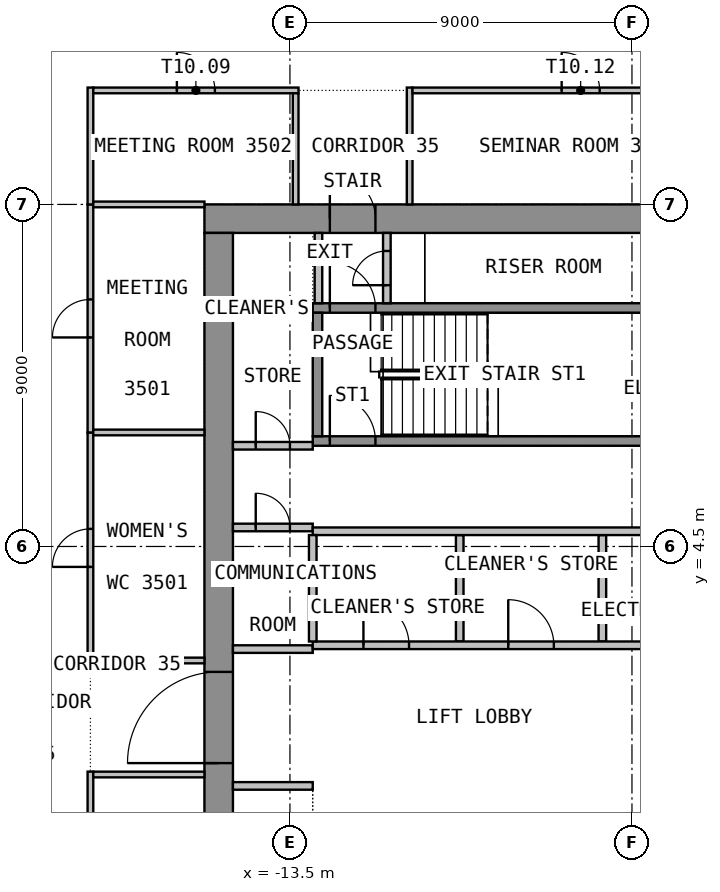
"""IFC4 building model, lengths in metres.
Left out: names, types, materials, properties, quantities, classifications, styles, units other than length and angle.
Written with IfcOpenShell. Run it as: python <this file> out.ifc"""

import sys

from ifc_helpers import new_model, si_unit, direction, frame, frame_2d, origin, place, context, subcontext, project, spatial, rectangle, extrude, element, fill, save


model = new_model("IFC4")
c1 = context("Model", 3, precision=1e-05, world=origin(), true_north=direction((0.0, 1.0)))
c2 = subcontext(c1, "Body", "Model", "MODEL_VIEW")
j1 = project(units=[si_unit("LENGTHUNIT", "METRE"), si_unit("PLANEANGLEUNIT", "RADIAN")], contexts=[c1])
p1 = place(None, origin())
s1 = spatial("IfcSite", under=j1, at=p1, CompositionType="ELEMENT")
p2 = place(p1, origin())
s2 = spatial("IfcBuilding", under=s1, at=p2, CompositionType="ELEMENT")
p3 = place(p2, frame((0.0, 0.0, 144.3)))
s3 = spatial("IfcBuildingStorey", under=s2, at=p3, CompositionType="ELEMENT", Elevation=144.3)
p4 = place(p3, frame((-15.75, 13.125, 0.0), z_axis=(0.0, 0.0, 1.0), x_axis=(1.0, 0.0, 0.0)))
e1 = element("IfcWall", 1, at=p4, inside=s3, PredefinedType="SHEAR", context=c2, shape_type="SweptSolid", body=[
    extrude(rectangle(XDim=31.5, YDim=0.75, at=frame_2d((15.75, 0.0))), origin(), (0.0, 0.0, 1.0), 3.575),
])
p5 = place(p4, frame((14.55, 0.0, 0.0)))
e2 = element("IfcOpeningElement", 2, at=p5, cuts=e1, PredefinedType="OPENING", context=c2, shape_type="SweptSolid", body=[
    extrude(rectangle(XDim=2.4, YDim=2.1, at=frame_2d((1.2, 1.05))), frame((0.0, 0.385, 0.0), z_axis=(0.0, -1.0, 0.0), x_axis=(1.0, 0.0, 0.0)), (0.0, 0.0, 1.0), 0.77),
])
p6 = place(p4, frame((3.3, 0.0, 0.0)))
e3 = element("IfcOpeningElement", 3, at=p6, cuts=e1, PredefinedType="OPENING", context=c2, shape_type="SweptSolid", body=[
    extrude(rectangle(XDim=1.2, YDim=2.1, at=frame_2d((0.6, 1.05))), frame((0.0, 0.385, 0.0), z_axis=(0.0, -1.0, 0.0), x_axis=(1.0, 0.0, 0.0)), (0.0, 0.0, 1.0), 0.77),
])
p7 = place(p4, frame((27.0, 0.0, 0.0)))
e4 = element("IfcOpeningElement", 4, at=p7, cuts=e1, PredefinedType="OPENING", context=c2, shape_type="SweptSolid", body=[
    extrude(rectangle(XDim=1.2, YDim=2.1, at=frame_2d((0.6, 1.05))), frame((0.0, 0.385, 0.0), z_axis=(0.0, -1.0, 0.0), x_axis=(1.0, 0.0, 0.0)), (0.0, 0.0, 1.0), 0.77),
])
p8 = place(p3, frame((-15.375, -12.75, 0.0), z_axis=(0.0, 0.0, 1.0), x_axis=(0.0, 1.0, 0.0)))
e5 = element("IfcWall", 5, at=p8, inside=s3, PredefinedType="SHEAR", context=c2, shape_type="SweptSolid", body=[
    extrude(rectangle(XDim=25.5, YDim=0.75, at=frame_2d((12.75, 0.0))), origin(), (0.0, 0.0, 1.0), 3.575),
])
p9 = place(p8, frame((11.55, 0.0, 0.0)))
e6 = element("IfcOpeningElement", 6, at=p9, cuts=e5, PredefinedType="OPENING", context=c2, shape_type="SweptSolid", body=[
    extrude(rectangle(XDim=2.4, YDim=2.1, at=frame_2d((1.2, 1.05))), frame((0.0, 0.385, 0.0), z_axis=(0.0, -1.0, 0.0), x_axis=(1.0, 0.0, 0.0)), (0.0, 0.0, 1.0), 0.77),
])
p10 = place(p3, frame((-12.9, 7.275, 0.0), z_axis=(0.0, 0.0, 1.0), x_axis=(1.0, 0.0, 0.0)))
e7 = element("IfcWall", 7, at=p10, inside=s3, PredefinedType="SHEAR", context=c2, shape_type="SweptSolid", body=[
    extrude(rectangle(XDim=10.1, YDim=0.25, at=frame_2d((5.05, 0.0))), origin(), (0.0, 0.0, 1.0), 3.575),
])
p11 = place(p10, frame((0.45, 0.0, 0.0)))
e8 = element("IfcOpeningElement", 8, at=p11, cuts=e7, PredefinedType="OPENING", context=c2, shape_type="SweptSolid", body=[
    extrude(rectangle(XDim=1.2, YDim=2.1, at=frame_2d((0.6, 1.05))), frame((0.0, 0.135, 0.0), z_axis=(0.0, -1.0, 0.0), x_axis=(1.0, 0.0, 0.0)), (0.0, 0.0, 1.0), 0.27),
])
p12 = place(p3, frame((-12.9, 10.775, 0.0), z_axis=(0.0, 0.0, 1.0), x_axis=(1.0, 0.0, 0.0)))
e9 = element("IfcWall", 9, at=p12, inside=s3, PredefinedType="SHEAR", context=c2, shape_type="SweptSolid", body=[
    extrude(rectangle(XDim=10.1, YDim=0.25, at=frame_2d((5.05, 0.0))), origin(), (0.0, 0.0, 1.0), 3.575),
])
p13 = place(p12, frame((0.45, 0.0, 0.0)))
e10 = element("IfcOpeningElement", 10, at=p13, cuts=e9, PredefinedType="OPENING", context=c2, shape_type="SweptSolid", body=[
    extrude(rectangle(XDim=1.2, YDim=2.1, at=frame_2d((0.6, 1.05))), frame((0.0, 0.135, 0.0), z_axis=(0.0, -1.0, 0.0), x_axis=(1.0, 0.0, 0.0)), (0.0, 0.0, 1.0), 0.27),
])
p14 = place(p3, frame((-12.775, 7.4, 0.0), z_axis=(0.0, 0.0, 1.0), x_axis=(0.0, 1.0, 0.0)))
e11 = element("IfcWall", 11, at=p14, inside=s3, PredefinedType="SHEAR", context=c2, shape_type="SweptSolid", body=[
    extrude(rectangle(XDim=3.25, YDim=0.25, at=frame_2d((1.625, 0.0))), origin(), (0.0, 0.0, 1.0), 3.575),
])
p15 = place(p3, frame((-12.75, 10.9, 0.0), z_axis=(0.0, 0.0, 1.0), x_axis=(0.0, 1.0, 0.0)))
e12 = element("IfcWall", 12, at=p15, inside=s3, PredefinedType="PARTITIONING", context=c2, shape_type="SweptSolid", body=[
    extrude(rectangle(XDim=1.85, YDim=0.2, at=frame_2d((0.925, 0.0))), origin(), (0.0, 0.0, 1.0), 3.575),
])
p16 = place(p3, frame((-10.95, 10.9, 0.0), z_axis=(0.0, 0.0, 1.0), x_axis=(0.0, 1.0, 0.0)))
e13 = element("IfcWall", 13, at=p16, inside=s3, PredefinedType="PARTITIONING", context=c2, shape_type="SweptSolid", body=[
    extrude(rectangle(XDim=1.85, YDim=0.2, at=frame_2d((0.925, 0.0))), origin(), (0.0, 0.0, 1.0), 3.575),
])
p17 = place(p16, frame((0.475, 0.0, 0.0)))
e14 = element("IfcOpeningElement", 14, at=p17, cuts=e13, PredefinedType="OPENING", context=c2, shape_type="SweptSolid", body=[
    extrude(rectangle(XDim=0.9, YDim=2.1, at=frame_2d((0.45, 1.05))), frame((0.0, 0.11, 0.0), z_axis=(0.0, -1.0, 0.0), x_axis=(1.0, 0.0, 0.0)), (0.0, 0.0, 1.0), 0.22),
])
p18 = place(p3, frame((-15.0, 7.15, 0.0), z_axis=(0.0, 0.0, 1.0), x_axis=(1.0, 0.0, 0.0)))
e15 = element("IfcWall", 15, at=p18, inside=s3, PredefinedType="PARTITIONING", context=c2, shape_type="SweptSolid", body=[
    extrude(rectangle(XDim=2.1, YDim=0.2, at=frame_2d((1.05, 0.0))), origin(), (0.0, 0.0, 1.0), 3.575),
])
p19 = place(p18, frame((0.6, 0.0, 0.0)))
e16 = element("IfcOpeningElement", 16, at=p19, cuts=e15, PredefinedType="OPENING", context=c2, shape_type="SweptSolid", body=[
    extrude(rectangle(XDim=0.9, YDim=2.1, at=frame_2d((0.45, 1.05))), frame((0.0, 0.11, 0.0), z_axis=(0.0, -1.0, 0.0), x_axis=(1.0, 0.0, 0.0)), (0.0, 0.0, 1.0), 0.22),
])
p20 = place(p3, frame((-15.0, 5.0, 0.0), z_axis=(0.0, 0.0, 1.0), x_axis=(1.0, 0.0, 0.0)))
e17 = element("IfcWall", 17, at=p20, inside=s3, PredefinedType="PARTITIONING", context=c2, shape_type="SweptSolid", body=[
    extrude(rectangle(XDim=2.1, YDim=0.2, at=frame_2d((1.05, 0.0))), origin(), (0.0, 0.0, 1.0), 3.575),
])
p21 = place(p20, frame((0.6, 0.0, 0.0)))
e18 = element("IfcOpeningElement", 18, at=p21, cuts=e17, PredefinedType="OPENING", context=c2, shape_type="SweptSolid", body=[
    extrude(rectangle(XDim=0.9, YDim=2.1, at=frame_2d((0.45, 1.05))), frame((0.0, 0.11, 0.0), z_axis=(0.0, -1.0, 0.0), x_axis=(1.0, 0.0, 0.0)), (0.0, 0.0, 1.0), 0.22),
])
for number, where, z_axis, x_axis in (
    (19, (-15.0, 1.8, 0.0), (0.0, 0.0, 1.0), (1.0, 0.0, 0.0)),
    (20, (-15.0, -1.8, 0.0), (0.0, 0.0, 1.0), (1.0, 0.0, 0.0)),
):
    element("IfcWall", number, at=place(p3, frame(where, z_axis=z_axis, x_axis=x_axis)), inside=s3, PredefinedType="PARTITIONING", context=c2, shape_type="SweptSolid", body=[
        extrude(rectangle(XDim=2.1, YDim=0.2, at=frame_2d((1.05, 0.0))), origin(), (0.0, 0.0, 1.0), 3.575),
    ])
for number, where, z_axis, x_axis in (
    (21, (-9.032, 2.0, 0.0), (0.0, 0.0, 1.0), (0.0, 1.0, 0.0)),
    (22, (-5.279, 2.0, 0.0), (0.0, 0.0, 1.0), (0.0, 1.0, 0.0)),
):
    element("IfcWall", number, at=place(p3, frame(where, z_axis=z_axis, x_axis=x_axis)), inside=s3, PredefinedType="PARTITIONING", context=c2, shape_type="SweptSolid", body=[
        extrude(rectangle(XDim=2.8, YDim=0.2, at=frame_2d((1.4, 0.0))), origin(), (0.0, 0.0, 1.0), 3.575),
    ])
p22 = place(p3, frame((-12.9, 1.9, 0.0), z_axis=(0.0, 0.0, 1.0), x_axis=(1.0, 0.0, 0.0)))
e23 = element("IfcWall", 23, at=p22, inside=s3, PredefinedType="PARTITIONING", context=c2, shape_type="SweptSolid", body=[
    extrude(rectangle(XDim=11.375, YDim=0.2, at=frame_2d((5.688, 0.0))), origin(), (0.0, 0.0, 1.0), 3.575),
])
p23 = place(p22, frame((1.334, 0.0, 0.0)))
e24 = element("IfcOpeningElement", 24, at=p23, cuts=e23, PredefinedType="OPENING", context=c2, shape_type="SweptSolid", body=[
    extrude(rectangle(XDim=1.2, YDim=2.1, at=frame_2d((0.6, 1.05))), frame((0.0, 0.11, 0.0), z_axis=(0.0, -1.0, 0.0), x_axis=(1.0, 0.0, 0.0)), (0.0, 0.0, 1.0), 0.22),
])
p24 = place(p22, frame((5.144, 0.0, 0.0)))
e25 = element("IfcOpeningElement", 25, at=p24, cuts=e23, PredefinedType="OPENING", context=c2, shape_type="SweptSolid", body=[
    extrude(rectangle(XDim=1.2, YDim=2.1, at=frame_2d((0.6, 1.05))), frame((0.0, 0.11, 0.0), z_axis=(0.0, -1.0, 0.0), x_axis=(1.0, 0.0, 0.0)), (0.0, 0.0, 1.0), 0.22),
])
p25 = place(p22, frame((8.898, 0.0, 0.0)))
e26 = element("IfcOpeningElement", 26, at=p25, cuts=e23, PredefinedType="OPENING", context=c2, shape_type="SweptSolid", body=[
    extrude(rectangle(XDim=1.2, YDim=2.1, at=frame_2d((0.6, 1.05))), frame((0.0, 0.11, 0.0), z_axis=(0.0, -1.0, 0.0), x_axis=(1.0, 0.0, 0.0)), (0.0, 0.0, 1.0), 0.22),
])
p26 = place(p3, frame((-12.9, 4.9, 0.0), z_axis=(0.0, 0.0, 1.0), x_axis=(1.0, 0.0, 0.0)))
e27 = element("IfcWall", 27, at=p26, inside=s3, PredefinedType="PARTITIONING", context=c2, shape_type="SweptSolid", body=[
    extrude(rectangle(XDim=11.375, YDim=0.2, at=frame_2d((5.688, 0.0))), origin(), (0.0, 0.0, 1.0), 3.575),
])
p27 = place(p3, frame((-12.9, 2.0, 0.0), z_axis=(0.0, 0.0, 1.0), x_axis=(0.0, 1.0, 0.0)))
e28 = element("IfcWall", 28, at=p27, inside=s3, PredefinedType="PARTITIONING", context=c2, shape_type="SweptSolid", body=[
    extrude(rectangle(XDim=2.8, YDim=0.2, at=frame_2d((1.4, 0.0))), origin(), (0.0, 0.0, 1.0), 3.575),
])
p28 = place(p3, frame((-18.75, -13.5, 0.0), z_axis=(0.0, 0.0, 1.0), x_axis=(0.0, 1.0, 0.0)))
e29 = element("IfcWall", 29, at=p28, inside=s3, PredefinedType="PARTITIONING", context=c2, shape_type="SweptSolid", body=[
    extrude(rectangle(XDim=12.075, YDim=0.15, at=frame_2d((6.038, 0.0))), origin(), (0.0, 0.0, 1.0), 3.575),
])
p29 = place(p28, frame((5.538, 0.0, 0.0)))
e30 = element("IfcOpeningElement", 30, at=p29, cuts=e29, PredefinedType="OPENING", context=c2, shape_type="SweptSolid", body=[
    extrude(rectangle(XDim=1.0, YDim=2.1, at=frame_2d((0.5, 1.05))), frame((0.0, 0.085, 0.0), z_axis=(0.0, -1.0, 0.0), x_axis=(1.0, 0.0, 0.0)), (0.0, 0.0, 1.0), 0.17),
])
p30 = place(p3, frame((-18.675, -1.5, 0.0), z_axis=(0.0, 0.0, 1.0), x_axis=(1.0, 0.0, 0.0)))
e31 = element("IfcWall", 31, at=p30, inside=s3, PredefinedType="PARTITIONING", context=c2, shape_type="SweptSolid", body=[
    extrude(rectangle(XDim=2.925, YDim=0.15, at=frame_2d((1.462, 0.0))), origin(), (0.0, 0.0, 1.0), 3.575),
])
p31 = place(p3, frame((-18.75, 1.425, 0.0), z_axis=(0.0, 0.0, 1.0), x_axis=(0.0, 1.0, 0.0)))
e32 = element("IfcWall", 32, at=p31, inside=s3, PredefinedType="PARTITIONING", context=c2, shape_type="SweptSolid", body=[
    extrude(rectangle(XDim=6.075, YDim=0.15, at=frame_2d((3.038, 0.0))), origin(), (0.0, 0.0, 1.0), 3.575),
])
p32 = place(p31, frame((2.538, 0.0, 0.0)))
e33 = element("IfcOpeningElement", 33, at=p32, cuts=e32, PredefinedType="OPENING", context=c2, shape_type="SweptSolid", body=[
    extrude(rectangle(XDim=1.0, YDim=2.1, at=frame_2d((0.5, 1.05))), frame((0.0, 0.085, 0.0), z_axis=(0.0, -1.0, 0.0), x_axis=(1.0, 0.0, 0.0)), (0.0, 0.0, 1.0), 0.17),
])
p33 = place(p3, frame((-15.75, 1.5, 0.0), z_axis=(0.0, 0.0, 1.0), x_axis=(-1.0, 0.0, 0.0)))
e34 = element("IfcWall", 34, at=p33, inside=s3, PredefinedType="PARTITIONING", context=c2, shape_type="SweptSolid", body=[
    extrude(rectangle(XDim=2.925, YDim=0.15, at=frame_2d((1.462, 0.0))), origin(), (0.0, 0.0, 1.0), 3.575),
])
p34 = place(p3, frame((-18.75, 7.5, 0.0), z_axis=(0.0, 0.0, 1.0), x_axis=(0.0, 1.0, 0.0)))
e35 = element("IfcWall", 35, at=p34, inside=s3, PredefinedType="PARTITIONING", context=c2, shape_type="SweptSolid", body=[
    extrude(rectangle(XDim=6.0, YDim=0.15, at=frame_2d((3.0, 0.0))), origin(), (0.0, 0.0, 1.0), 3.575),
])
p35 = place(p34, frame((2.5, 0.0, 0.0)))
e36 = element("IfcOpeningElement", 36, at=p35, cuts=e35, PredefinedType="OPENING", context=c2, shape_type="SweptSolid", body=[
    extrude(rectangle(XDim=1.0, YDim=2.1, at=frame_2d((0.5, 1.05))), frame((0.0, 0.085, 0.0), z_axis=(0.0, -1.0, 0.0), x_axis=(1.0, 0.0, 0.0)), (0.0, 0.0, 1.0), 0.17),
])
p36 = place(p3, frame((-18.675, 7.5, 0.0), z_axis=(0.0, 0.0, 1.0), x_axis=(1.0, 0.0, 0.0)))
e37 = element("IfcWall", 37, at=p36, inside=s3, PredefinedType="PARTITIONING", context=c2, shape_type="SweptSolid", body=[
    extrude(rectangle(XDim=2.925, YDim=0.15, at=frame_2d((1.462, 0.0))), origin(), (0.0, 0.0, 1.0), 3.575),
])
p37 = place(p3, frame((-18.75, 13.5, 0.0), z_axis=(0.0, 0.0, 1.0), x_axis=(0.0, 1.0, 0.0)))
e38 = element("IfcWall", 38, at=p37, inside=s3, PredefinedType="PARTITIONING", context=c2, shape_type="SweptSolid", body=[
    extrude(rectangle(XDim=3.075, YDim=0.15, at=frame_2d((1.538, 0.0))), origin(), (0.0, 0.0, 1.0), 3.575),
])
p38 = place(p3, frame((-18.675, 13.5, 0.0), z_axis=(0.0, 0.0, 1.0), x_axis=(1.0, 0.0, 0.0)))
e39 = element("IfcWall", 39, at=p38, inside=s3, PredefinedType="PARTITIONING", context=c2, shape_type="SweptSolid", body=[
    extrude(rectangle(XDim=2.925, YDim=0.15, at=frame_2d((1.462, 0.0))), origin(), (0.0, 0.0, 1.0), 3.575),
])
p39 = place(p3, frame((-18.675, 16.5, 0.0), z_axis=(0.0, 0.0, 1.0), x_axis=(1.0, 0.0, 0.0)))
e40 = element("IfcWall", 40, at=p39, inside=s3, PredefinedType="PARTITIONING", context=c2, shape_type="SweptSolid", body=[
    extrude(rectangle(XDim=5.4, YDim=0.15, at=frame_2d((2.7, 0.0))), origin(), (0.0, 0.0, 1.0), 3.575),
])
p40 = place(p39, frame((2.2, 0.0, 0.0)))
e41 = element("IfcOpeningElement", 41, at=p40, cuts=e40, PredefinedType="OPENING", context=c2, shape_type="SweptSolid", body=[
    extrude(rectangle(XDim=1.0, YDim=2.1, at=frame_2d((0.5, 1.05))), frame((0.0, 0.085, 0.0), z_axis=(0.0, -1.0, 0.0), x_axis=(1.0, 0.0, 0.0)), (0.0, 0.0, 1.0), 0.17),
])
p41 = place(p3, frame((-13.35, 16.425, 0.0), z_axis=(0.0, 0.0, 1.0), x_axis=(0.0, -1.0, 0.0)))
e42 = element("IfcWall", 42, at=p41, inside=s3, PredefinedType="PARTITIONING", context=c2, shape_type="SweptSolid", body=[
    extrude(rectangle(XDim=2.925, YDim=0.15, at=frame_2d((1.462, 0.0))), origin(), (0.0, 0.0, 1.0), 3.575),
])
p42 = place(p3, frame((-10.35, 13.5, 0.0), z_axis=(0.0, 0.0, 1.0), x_axis=(0.0, 1.0, 0.0)))
e43 = element("IfcWall", 43, at=p42, inside=s3, PredefinedType="PARTITIONING", context=c2, shape_type="SweptSolid", body=[
    extrude(rectangle(XDim=3.075, YDim=0.15, at=frame_2d((1.538, 0.0))), origin(), (0.0, 0.0, 1.0), 3.575),
])
p43 = place(p3, frame((-10.275, 16.5, 0.0), z_axis=(0.0, 0.0, 1.0), x_axis=(1.0, 0.0, 0.0)))
e44 = element("IfcWall", 44, at=p43, inside=s3, PredefinedType="PARTITIONING", context=c2, shape_type="SweptSolid", body=[
    extrude(rectangle(XDim=8.85, YDim=0.15, at=frame_2d((4.425, 0.0))), origin(), (0.0, 0.0, 1.0), 3.575),
])
p44 = place(p43, frame((3.925, 0.0, 0.0)))
e45 = element("IfcOpeningElement", 45, at=p44, cuts=e44, PredefinedType="OPENING", context=c2, shape_type="SweptSolid", body=[
    extrude(rectangle(XDim=1.0, YDim=2.1, at=frame_2d((0.5, 1.05))), frame((0.0, 0.085, 0.0), z_axis=(0.0, -1.0, 0.0), x_axis=(1.0, 0.0, 0.0)), (0.0, 0.0, 1.0), 0.17),
])
p45 = place(p9, origin())
e46 = element("IfcDoor", 46, at=p45, inside=s3, OperationType="DOUBLE_DOOR_DOUBLE_SWING", PredefinedType="DOOR", context=c2, shape_type="SweptSolid", body=[
    extrude(rectangle(XDim=2.4, YDim=2.1, at=frame_2d((1.2, 1.05))), frame((0.0, 0.025, 0.0), z_axis=(0.0, -1.0, 0.0), x_axis=(1.0, 0.0, 0.0)), (0.0, 0.0, 1.0), 0.05),
])
fill(e6, e46)
p46 = place(p6, origin())
e47 = element("IfcDoor", 47, at=p46, inside=s3, OperationType="SINGLE_SWING_RIGHT", PredefinedType="DOOR", context=c2, shape_type="SweptSolid", body=[
    extrude(rectangle(XDim=1.2, YDim=2.1, at=frame_2d((0.6, 1.05))), frame((0.0, 0.025, 0.0), z_axis=(0.0, -1.0, 0.0), x_axis=(1.0, 0.0, 0.0)), (0.0, 0.0, 1.0), 0.05),
])
fill(e3, e47)
p47 = place(p11, origin())
e48 = element("IfcDoor", 48, at=p47, inside=s3, OperationType="SINGLE_SWING_LEFT", PredefinedType="DOOR", context=c2, shape_type="SweptSolid", body=[
    extrude(rectangle(XDim=1.2, YDim=2.1, at=frame_2d((0.6, 1.05))), frame((0.0, 0.025, 0.0), z_axis=(0.0, -1.0, 0.0), x_axis=(1.0, 0.0, 0.0)), (0.0, 0.0, 1.0), 0.05),
])
fill(e8, e48)
p48 = place(p13, origin())
e49 = element("IfcDoor", 49, at=p48, inside=s3, OperationType="SINGLE_SWING_RIGHT", PredefinedType="DOOR", context=c2, shape_type="SweptSolid", body=[
    extrude(rectangle(XDim=1.2, YDim=2.1, at=frame_2d((0.6, 1.05))), frame((0.0, 0.025, 0.0), z_axis=(0.0, -1.0, 0.0), x_axis=(1.0, 0.0, 0.0)), (0.0, 0.0, 1.0), 0.05),
])
fill(e10, e49)
p49 = place(p17, origin())
e50 = element("IfcDoor", 50, at=p49, inside=s3, OperationType="SINGLE_SWING_LEFT", PredefinedType="DOOR", context=c2, shape_type="SweptSolid", body=[
    extrude(rectangle(XDim=0.9, YDim=2.1, at=frame_2d((0.45, 1.05))), frame((0.0, 0.025, 0.0), z_axis=(0.0, -1.0, 0.0), x_axis=(1.0, 0.0, 0.0)), (0.0, 0.0, 1.0), 0.05),
])
fill(e14, e50)
p50 = place(p19, origin())
e51 = element("IfcDoor", 51, at=p50, inside=s3, OperationType="SINGLE_SWING_LEFT", PredefinedType="DOOR", context=c2, shape_type="SweptSolid", body=[
    extrude(rectangle(XDim=0.9, YDim=2.1, at=frame_2d((0.45, 1.05))), frame((0.0, 0.025, 0.0), z_axis=(0.0, -1.0, 0.0), x_axis=(1.0, 0.0, 0.0)), (0.0, 0.0, 1.0), 0.05),
])
fill(e16, e51)
p51 = place(p21, origin())
e52 = element("IfcDoor", 52, at=p51, inside=s3, OperationType="SINGLE_SWING_LEFT", PredefinedType="DOOR", context=c2, shape_type="SweptSolid", body=[
    extrude(rectangle(XDim=0.9, YDim=2.1, at=frame_2d((0.45, 1.05))), frame((0.0, 0.025, 0.0), z_axis=(0.0, -1.0, 0.0), x_axis=(1.0, 0.0, 0.0)), (0.0, 0.0, 1.0), 0.05),
])
fill(e18, e52)
p52 = place(p23, origin())
e53 = element("IfcDoor", 53, at=p52, inside=s3, OperationType="SINGLE_SWING_RIGHT", PredefinedType="DOOR", context=c2, shape_type="SweptSolid", body=[
    extrude(rectangle(XDim=1.2, YDim=2.1, at=frame_2d((0.6, 1.05))), frame((0.0, 0.025, 0.0), z_axis=(0.0, -1.0, 0.0), x_axis=(1.0, 0.0, 0.0)), (0.0, 0.0, 1.0), 0.05),
])
fill(e24, e53)
p53 = place(p24, origin())
e54 = element("IfcDoor", 54, at=p53, inside=s3, OperationType="SINGLE_SWING_RIGHT", PredefinedType="DOOR", context=c2, shape_type="SweptSolid", body=[
    extrude(rectangle(XDim=1.2, YDim=2.1, at=frame_2d((0.6, 1.05))), frame((0.0, 0.025, 0.0), z_axis=(0.0, -1.0, 0.0), x_axis=(1.0, 0.0, 0.0)), (0.0, 0.0, 1.0), 0.05),
])
fill(e25, e54)
p54 = place(p32, origin())
e55 = element("IfcDoor", 55, at=p54, inside=s3, OperationType="SINGLE_SWING_RIGHT", PredefinedType="DOOR", context=c2, shape_type="SweptSolid", body=[
    extrude(rectangle(XDim=1.0, YDim=2.1, at=frame_2d((0.5, 1.05))), frame((0.0, 0.025, 0.0), z_axis=(0.0, -1.0, 0.0), x_axis=(1.0, 0.0, 0.0)), (0.0, 0.0, 1.0), 0.05),
])
fill(e33, e55)
p55 = place(p35, origin())
e56 = element("IfcDoor", 56, at=p55, inside=s3, OperationType="SINGLE_SWING_LEFT", PredefinedType="DOOR", context=c2, shape_type="SweptSolid", body=[
    extrude(rectangle(XDim=1.0, YDim=2.1, at=frame_2d((0.5, 1.05))), frame((0.0, 0.025, 0.0), z_axis=(0.0, -1.0, 0.0), x_axis=(1.0, 0.0, 0.0)), (0.0, 0.0, 1.0), 0.05),
])
fill(e36, e56)
p56 = place(p40, origin())
e57 = element("IfcDoor", 57, at=p56, inside=s3, OperationType="SINGLE_SWING_RIGHT", PredefinedType="DOOR", context=c2, shape_type="SweptSolid", body=[
    extrude(rectangle(XDim=1.0, YDim=2.1, at=frame_2d((0.5, 1.05))), frame((0.0, 0.025, 0.0), z_axis=(0.0, -1.0, 0.0), x_axis=(1.0, 0.0, 0.0)), (0.0, 0.0, 1.0), 0.05),
])
fill(e41, e57)
p57 = place(p44, origin())
e58 = element("IfcDoor", 58, at=p57, inside=s3, OperationType="SINGLE_SWING_LEFT", PredefinedType="DOOR", context=c2, shape_type="SweptSolid", body=[
    extrude(rectangle(XDim=1.0, YDim=2.1, at=frame_2d((0.5, 1.05))), frame((0.0, 0.025, 0.0), z_axis=(0.0, -1.0, 0.0), x_axis=(1.0, 0.0, 0.0)), (0.0, 0.0, 1.0), 0.05),
])
fill(e45, e58)
save(model, sys.argv[1])
